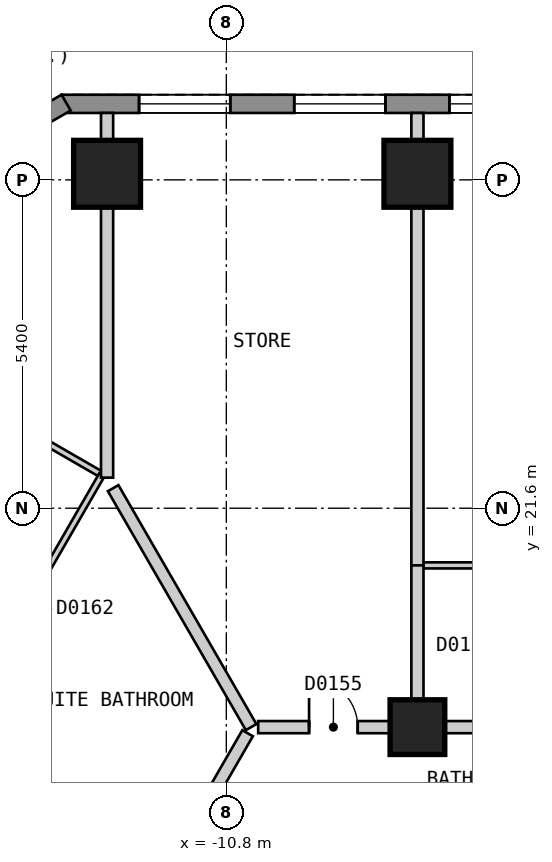
"""IFC4 building model, lengths in metres.
Left out: names, types, materials, properties, quantities, classifications, styles, units other than length and angle.
Written with IfcOpenShell. Run it as: python <this file> out.ifc"""

import sys

from ifc_helpers import new_model, si_unit, direction, frame, frame_2d, origin, origin_2d, place, context, subcontext, project, spatial, polyline, rectangle, outline, extrude, element, fill, save


model = new_model("IFC4")
c1 = context("Model", 3, precision=1e-05, world=origin(), true_north=direction((0.0, 1.0)))
c2 = subcontext(c1, "Body", "Model", "MODEL_VIEW")
j1 = project(units=[si_unit("LENGTHUNIT", "METRE"), si_unit("PLANEANGLEUNIT", "RADIAN")], contexts=[c1])
p1 = place(None, origin())
s1 = spatial("IfcSite", under=j1, at=p1, CompositionType="ELEMENT")
p2 = place(p1, origin())
s2 = spatial("IfcBuilding", under=s1, at=p2, CompositionType="ELEMENT")
p3 = place(p2, frame((0.0, 0.0, 29.4)))
s3 = spatial("IfcBuildingStorey", under=s2, at=p3, CompositionType="ELEMENT", Elevation=29.4)
for number, where, z_axis, x_axis in (
    (1, (-7.657, 27.1, 0.0), (0.0, 0.0, 1.0), (-1.0, 0.0, 0.0)),
    (2, (-12.761, 27.1, 0.0), (0.0, 0.0, 1.0), (-1.0, 0.0, 0.0)),
):
    element("IfcColumn", number, at=place(p3, frame(where, z_axis=z_axis, x_axis=x_axis)), inside=s3, PredefinedType="COLUMN", context=c2, shape_type="SweptSolid", body=[
        extrude(rectangle(XDim=1.1, YDim=1.1, at=origin_2d()), origin(), (0.0, 0.0, 1.0), 3.0),
    ])
p4 = place(p3, frame((-7.657, 18.0, 0.0), z_axis=(0.0, 0.0, 1.0), x_axis=(-1.0, 0.0, 0.0)))
e3 = element("IfcColumn", 3, at=p4, inside=s3, PredefinedType="COLUMN", context=c2, shape_type="SweptSolid", body=[
    extrude(rectangle(XDim=0.9, YDim=0.9, at=origin_2d()), origin(), (0.0, 0.0, 1.0), 3.0),
])
p5 = place(p3, frame((13.51, 28.25, 0.0), z_axis=(0.0, 0.0, 1.0), x_axis=(-1.0, 0.0, 0.0)))
e4 = element("IfcWall", 4, at=p5, inside=s3, PredefinedType="SOLIDWALL", context=c2, shape_type="SweptSolid", body=[
    extrude(outline(polyline([(0.0, -0.15), (27.02, -0.15), (26.94, 0.15), (0.08, 0.15), (0.0, -0.15)])), origin(), (0.0, 0.0, 1.0), 2.7),
])
p6 = place(p5, frame((1.277, 0.0, 0.15)))
e5 = element("IfcOpeningElement", 5, at=p6, cuts=e4, PredefinedType="OPENING", context=c2, shape_type="SweptSolid", body=[
    extrude(rectangle(XDim=1.5, YDim=2.1, at=frame_2d((0.75, 1.05))), frame((0.0, 0.16, 0.0), z_axis=(0.0, -1.0, 0.0), x_axis=(1.0, 0.0, 0.0)), (0.0, 0.0, 1.0), 0.32),
])
p7 = place(p5, frame((3.829, 0.0, 0.15)))
e6 = element("IfcOpeningElement", 6, at=p7, cuts=e4, PredefinedType="OPENING", context=c2, shape_type="SweptSolid", body=[
    extrude(rectangle(XDim=1.5, YDim=2.1, at=frame_2d((0.75, 1.05))), frame((0.0, 0.16, 0.0), z_axis=(0.0, -1.0, 0.0), x_axis=(1.0, 0.0, 0.0)), (0.0, 0.0, 1.0), 0.32),
])
p8 = place(p5, frame((6.381, 0.0, 0.15)))
e7 = element("IfcOpeningElement", 7, at=p8, cuts=e4, PredefinedType="OPENING", context=c2, shape_type="SweptSolid", body=[
    extrude(rectangle(XDim=1.5, YDim=2.1, at=frame_2d((0.75, 1.05))), frame((0.0, 0.16, 0.0), z_axis=(0.0, -1.0, 0.0), x_axis=(1.0, 0.0, 0.0)), (0.0, 0.0, 1.0), 0.32),
])
p9 = place(p5, frame((8.933, 0.0, 0.15)))
e8 = element("IfcOpeningElement", 8, at=p9, cuts=e4, PredefinedType="OPENING", context=c2, shape_type="SweptSolid", body=[
    extrude(rectangle(XDim=1.5, YDim=2.1, at=frame_2d((0.75, 1.05))), frame((0.0, 0.16, 0.0), z_axis=(0.0, -1.0, 0.0), x_axis=(1.0, 0.0, 0.0)), (0.0, 0.0, 1.0), 0.32),
])
p10 = place(p5, frame((11.485, 0.0, 0.15)))
e9 = element("IfcOpeningElement", 9, at=p10, cuts=e4, PredefinedType="OPENING", context=c2, shape_type="SweptSolid", body=[
    extrude(rectangle(XDim=1.5, YDim=2.1, at=frame_2d((0.75, 1.05))), frame((0.0, 0.16, 0.0), z_axis=(0.0, -1.0, 0.0), x_axis=(1.0, 0.0, 0.0)), (0.0, 0.0, 1.0), 0.32),
])
p11 = place(p5, frame((14.037, 0.0, 0.15)))
e10 = element("IfcOpeningElement", 10, at=p11, cuts=e4, PredefinedType="OPENING", context=c2, shape_type="SweptSolid", body=[
    extrude(rectangle(XDim=1.5, YDim=2.1, at=frame_2d((0.75, 1.05))), frame((0.0, 0.16, 0.0), z_axis=(0.0, -1.0, 0.0), x_axis=(1.0, 0.0, 0.0)), (0.0, 0.0, 1.0), 0.32),
])
p12 = place(p5, frame((16.589, 0.0, 0.15)))
e11 = element("IfcOpeningElement", 11, at=p12, cuts=e4, PredefinedType="OPENING", context=c2, shape_type="SweptSolid", body=[
    extrude(rectangle(XDim=1.5, YDim=2.1, at=frame_2d((0.75, 1.05))), frame((0.0, 0.16, 0.0), z_axis=(0.0, -1.0, 0.0), x_axis=(1.0, 0.0, 0.0)), (0.0, 0.0, 1.0), 0.32),
])
p13 = place(p5, frame((19.141, 0.0, 0.15)))
e12 = element("IfcOpeningElement", 12, at=p13, cuts=e4, PredefinedType="OPENING", context=c2, shape_type="SweptSolid", body=[
    extrude(rectangle(XDim=1.5, YDim=2.1, at=frame_2d((0.75, 1.05))), frame((0.0, 0.16, 0.0), z_axis=(0.0, -1.0, 0.0), x_axis=(1.0, 0.0, 0.0)), (0.0, 0.0, 1.0), 0.32),
])
p14 = place(p5, frame((21.693, 0.0, 0.15)))
e13 = element("IfcOpeningElement", 13, at=p14, cuts=e4, PredefinedType="OPENING", context=c2, shape_type="SweptSolid", body=[
    extrude(rectangle(XDim=1.5, YDim=2.1, at=frame_2d((0.75, 1.05))), frame((0.0, 0.16, 0.0), z_axis=(0.0, -1.0, 0.0), x_axis=(1.0, 0.0, 0.0)), (0.0, 0.0, 1.0), 0.32),
])
p15 = place(p5, frame((24.245, 0.0, 0.15)))
e14 = element("IfcOpeningElement", 14, at=p15, cuts=e4, PredefinedType="OPENING", context=c2, shape_type="SweptSolid", body=[
    extrude(rectangle(XDim=1.5, YDim=2.1, at=frame_2d((0.75, 1.05))), frame((0.0, 0.16, 0.0), z_axis=(0.0, -1.0, 0.0), x_axis=(1.0, 0.0, 0.0)), (0.0, 0.0, 1.0), 0.32),
])
p16 = place(p3, frame((-13.435, 28.27, 0.0), z_axis=(0.0, 0.0, 1.0), x_axis=(-0.866010750942, -0.50002537861, 0.0)))
e15 = element("IfcWall", 15, at=p16, inside=s3, PredefinedType="SOLIDWALL", context=c2, shape_type="SweptSolid", body=[
    extrude(outline(polyline([(0.0, -0.15), (5.0, -0.15), (4.919, 0.15), (0.08, 0.15), (0.0, -0.15)])), origin(), (0.0, 0.0, 1.0), 2.7),
])
p17 = place(p16, frame((0.65, 0.0, 0.15)))
e16 = element("IfcOpeningElement", 16, at=p17, cuts=e15, PredefinedType="OPENING", context=c2, shape_type="SweptSolid", body=[
    extrude(rectangle(XDim=1.2, YDim=2.1, at=frame_2d((0.6, 1.05))), frame((0.0, 0.16, 0.0), z_axis=(0.0, -1.0, 0.0), x_axis=(1.0, 0.0, 0.0)), (0.0, 0.0, 1.0), 0.32),
])
p18 = place(p16, frame((3.149, 0.0, 0.15)))
e17 = element("IfcOpeningElement", 17, at=p18, cuts=e15, PredefinedType="OPENING", context=c2, shape_type="SweptSolid", body=[
    extrude(rectangle(XDim=1.2, YDim=2.1, at=frame_2d((0.6, 1.05))), frame((0.0, 0.16, 0.0), z_axis=(0.0, -1.0, 0.0), x_axis=(1.0, 0.0, 0.0)), (0.0, 0.0, 1.0), 0.32),
])
p19 = place(p3, frame((-10.276, 18.0, 0.0), z_axis=(0.0, 0.0, 1.0), x_axis=(1.0, 0.0, 0.0)))
e18 = element("IfcWall", 18, at=p19, inside=s3, PredefinedType="PARTITIONING", context=c2, shape_type="SweptSolid", body=[
    extrude(rectangle(XDim=20.61, YDim=0.2, at=frame_2d((10.305, 0.0))), origin(), (0.0, 0.0, 1.0), 2.7),
])
p20 = place(p19, frame((14.879, 0.0, 0.0)))
e19 = element("IfcOpeningElement", 19, at=p20, cuts=e18, PredefinedType="OPENING", context=c2, shape_type="SweptSolid", body=[
    extrude(rectangle(XDim=1.0, YDim=2.1, at=frame_2d((0.5, 1.05))), frame((0.0, 0.11, 0.0), z_axis=(0.0, -1.0, 0.0), x_axis=(1.0, 0.0, 0.0)), (0.0, 0.0, 1.0), 0.22),
])
p21 = place(p19, frame((9.775, 0.0, 0.0)))
e20 = element("IfcOpeningElement", 20, at=p21, cuts=e18, PredefinedType="OPENING", context=c2, shape_type="SweptSolid", body=[
    extrude(rectangle(XDim=1.0, YDim=2.1, at=frame_2d((0.5, 1.05))), frame((0.0, 0.11, 0.0), z_axis=(0.0, -1.0, 0.0), x_axis=(1.0, 0.0, 0.0)), (0.0, 0.0, 1.0), 0.22),
])
p22 = place(p19, frame((4.671, 0.0, 0.0)))
e21 = element("IfcOpeningElement", 21, at=p22, cuts=e18, PredefinedType="OPENING", context=c2, shape_type="SweptSolid", body=[
    extrude(rectangle(XDim=1.0, YDim=2.1, at=frame_2d((0.5, 1.05))), frame((0.0, 0.11, 0.0), z_axis=(0.0, -1.0, 0.0), x_axis=(1.0, 0.0, 0.0)), (0.0, 0.0, 1.0), 0.22),
])
p23 = place(p19, frame((0.837, 0.0, 0.0)))
e22 = element("IfcOpeningElement", 22, at=p23, cuts=e18, PredefinedType="OPENING", context=c2, shape_type="SweptSolid", body=[
    extrude(rectangle(XDim=0.8, YDim=2.1, at=frame_2d((0.4, 1.05))), frame((0.0, 0.11, 0.0), z_axis=(0.0, -1.0, 0.0), x_axis=(1.0, 0.0, 0.0)), (0.0, 0.0, 1.0), 0.22),
])
p24 = place(p3, frame((-20.727, 0.099, 0.0), z_axis=(0.0, 0.0, 1.0), x_axis=(0.499993204491, 0.866029327138, 0.0)))
e23 = element("IfcWall", 23, at=p24, inside=s3, PredefinedType="PARTITIONING", context=c2, shape_type="SweptSolid", body=[
    extrude(rectangle(XDim=20.554, YDim=0.2, at=frame_2d((10.277, 0.0))), origin(), (0.0, 0.0, 1.0), 2.7),
])
p25 = place(p24, frame((14.88, 0.0, 0.0)))
e24 = element("IfcOpeningElement", 24, at=p25, cuts=e23, PredefinedType="OPENING", context=c2, shape_type="SweptSolid", body=[
    extrude(rectangle(XDim=1.0, YDim=2.1, at=frame_2d((0.5, 1.05))), frame((0.0, 0.11, 0.0), z_axis=(0.0, -1.0, 0.0), x_axis=(1.0, 0.0, 0.0)), (0.0, 0.0, 1.0), 0.22),
])
p26 = place(p24, frame((4.673, 0.0, 0.0)))
e25 = element("IfcOpeningElement", 25, at=p26, cuts=e23, PredefinedType="OPENING", context=c2, shape_type="SweptSolid", body=[
    extrude(rectangle(XDim=1.0, YDim=2.1, at=frame_2d((0.5, 1.05))), frame((0.0, 0.11, 0.0), z_axis=(0.0, -1.0, 0.0), x_axis=(1.0, 0.0, 0.0)), (0.0, 0.0, 1.0), 0.22),
])
p27 = place(p3, frame((-17.955, 25.099, 0.0), z_axis=(0.0, 0.0, 1.0), x_axis=(0.866069217599, -0.499924104568, 0.0)))
e26 = element("IfcWall", 26, at=p27, inside=s3, PredefinedType="PARTITIONING", context=c2, shape_type="SweptSolid", body=[
    extrude(rectangle(XDim=5.869, YDim=0.1, at=frame_2d((2.935, 0.0))), origin(), (0.0, 0.0, 1.0), 2.7),
])
p28 = place(p27, frame((2.51, 0.0, 0.0)))
e27 = element("IfcOpeningElement", 27, at=p28, cuts=e26, PredefinedType="OPENING", context=c2, shape_type="SweptSolid", body=[
    extrude(rectangle(XDim=0.9, YDim=2.1, at=frame_2d((0.45, 1.05))), frame((0.0, 0.06, 0.0), z_axis=(0.0, -1.0, 0.0), x_axis=(1.0, 0.0, 0.0)), (0.0, 0.0, 1.0), 0.12),
])
p29 = place(p3, frame((-7.557, 20.66, 0.0), z_axis=(0.0, 0.0, 1.0), x_axis=(1.0, 0.0, 0.0)))
e28 = element("IfcWall", 28, at=p29, inside=s3, PredefinedType="PARTITIONING", context=c2, shape_type="SweptSolid", body=[
    extrude(rectangle(XDim=3.217, YDim=0.1, at=frame_2d((1.608, 0.0))), origin(), (0.0, 0.0, 1.0), 2.7),
])
p30 = place(p3, frame((-17.9, 13.395, 0.0), z_axis=(0.0, 0.0, 1.0), x_axis=(0.499949632511, 0.866054481515, 0.0)))
e29 = element("IfcWall", 29, at=p30, inside=s3, PredefinedType="PARTITIONING", context=c2, shape_type="SweptSolid", body=[
    extrude(rectangle(XDim=10.109, YDim=0.1, at=frame_2d((5.054, 0.0))), origin(), (0.0, 0.0, 1.0), 2.7),
])
p31 = place(p30, frame((2.002, 0.0, 0.0)))
e30 = element("IfcOpeningElement", 30, at=p31, cuts=e29, PredefinedType="OPENING", context=c2, shape_type="SweptSolid", body=[
    extrude(rectangle(XDim=0.9, YDim=2.1, at=frame_2d((0.45, 1.05))), frame((0.0, 0.06, 0.0), z_axis=(0.0, -1.0, 0.0), x_axis=(1.0, 0.0, 0.0)), (0.0, 0.0, 1.0), 0.12),
])
p32 = place(p30, frame((7.156, 0.0, 0.0)))
e31 = element("IfcOpeningElement", 31, at=p32, cuts=e29, PredefinedType="OPENING", context=c2, shape_type="SweptSolid", body=[
    extrude(rectangle(XDim=0.8, YDim=2.1, at=frame_2d((0.4, 1.05))), frame((0.0, 0.06, 0.0), z_axis=(0.0, -1.0, 0.0), x_axis=(1.0, 0.0, 0.0)), (0.0, 0.0, 1.0), 0.12),
])
p33 = place(p3, frame((-12.661, 21.93, 0.0), z_axis=(0.0, 0.0, 1.0), x_axis=(0.499975495332, -0.866039551099, 0.0)))
e32 = element("IfcWall", 32, at=p33, inside=s3, PredefinedType="PARTITIONING", context=c2, shape_type="SweptSolid", body=[
    extrude(rectangle(XDim=4.538, YDim=0.2, at=frame_2d((2.269, 0.0))), origin(), (0.0, 0.0, 1.0), 2.7),
])
p34 = place(p3, frame((-7.657, 28.1, 0.0), z_axis=(0.0, 0.0, 1.0), x_axis=(0.0, -1.0, 0.0)))
e33 = element("IfcWall", 33, at=p34, inside=s3, PredefinedType="PARTITIONING", context=c2, shape_type="SweptSolid", body=[
    extrude(rectangle(XDim=7.44, YDim=0.2, at=frame_2d((3.72, 0.0))), origin(), (0.0, 0.0, 1.0), 2.7),
])
p35 = place(p3, frame((-7.657, 18.1, 0.0), z_axis=(0.0, 0.0, 1.0), x_axis=(0.0, 1.0, 0.0)))
e34 = element("IfcWall", 34, at=p35, inside=s3, PredefinedType="PARTITIONING", context=c2, shape_type="SweptSolid", body=[
    extrude(rectangle(XDim=2.56, YDim=0.2, at=frame_2d((1.28, 0.0))), origin(), (0.0, 0.0, 1.0), 2.7),
])
p36 = place(p3, frame((-12.761, 22.103, 0.0), z_axis=(0.0, 0.0, 1.0), x_axis=(0.0, 1.0, 0.0)))
e35 = element("IfcWall", 35, at=p36, inside=s3, PredefinedType="PARTITIONING", context=c2, shape_type="SweptSolid", body=[
    extrude(rectangle(XDim=5.997, YDim=0.2, at=frame_2d((2.999, 0.0))), origin(), (0.0, 0.0, 1.0), 2.7),
])
p37 = place(p3, frame((-15.398, 17.729, 0.0), z_axis=(0.0, 0.0, 1.0), x_axis=(0.866039832988, -0.499975007054, 0.0)))
e36 = element("IfcWall", 36, at=p37, inside=s3, PredefinedType="PARTITIONING", context=c2, shape_type="SweptSolid", body=[
    extrude(rectangle(XDim=4.1, YDim=0.1, at=frame_2d((2.05, 0.0))), origin(), (0.0, 0.0, 1.0), 2.7),
])
p38 = place(p13, origin())
e37 = element("IfcWindow", 37, at=p38, inside=s3, PartitioningType="SINGLE_PANEL", PredefinedType="WINDOW", context=c2, shape_type="SweptSolid", body=[
    extrude(rectangle(XDim=1.5, YDim=2.1, at=frame_2d((0.75, 1.05))), frame((0.0, 0.03, 0.0), z_axis=(0.0, -1.0, 0.0), x_axis=(1.0, 0.0, 0.0)), (0.0, 0.0, 1.0), 0.06),
])
fill(e12, e37)
p39 = place(p14, origin())
e38 = element("IfcWindow", 38, at=p39, inside=s3, PartitioningType="SINGLE_PANEL", PredefinedType="WINDOW", context=c2, shape_type="SweptSolid", body=[
    extrude(rectangle(XDim=1.5, YDim=2.1, at=frame_2d((0.75, 1.05))), frame((0.0, 0.03, 0.0), z_axis=(0.0, -1.0, 0.0), x_axis=(1.0, 0.0, 0.0)), (0.0, 0.0, 1.0), 0.06),
])
fill(e13, e38)
p40 = place(p15, origin())
e39 = element("IfcWindow", 39, at=p40, inside=s3, PartitioningType="SINGLE_PANEL", PredefinedType="WINDOW", context=c2, shape_type="SweptSolid", body=[
    extrude(rectangle(XDim=1.5, YDim=2.1, at=frame_2d((0.75, 1.05))), frame((0.0, 0.03, 0.0), z_axis=(0.0, -1.0, 0.0), x_axis=(1.0, 0.0, 0.0)), (0.0, 0.0, 1.0), 0.06),
])
fill(e14, e39)
p41 = place(p23, origin())
e40 = element("IfcDoor", 40, at=p41, inside=s3, OperationType="SINGLE_SWING_LEFT", PredefinedType="DOOR", context=c2, shape_type="SweptSolid", body=[
    extrude(rectangle(XDim=0.8, YDim=2.1, at=frame_2d((0.4, 1.05))), frame((0.0, 0.025, 0.0), z_axis=(0.0, -1.0, 0.0), x_axis=(1.0, 0.0, 0.0)), (0.0, 0.0, 1.0), 0.05),
])
fill(e22, e40)
save(model, sys.argv[1])
